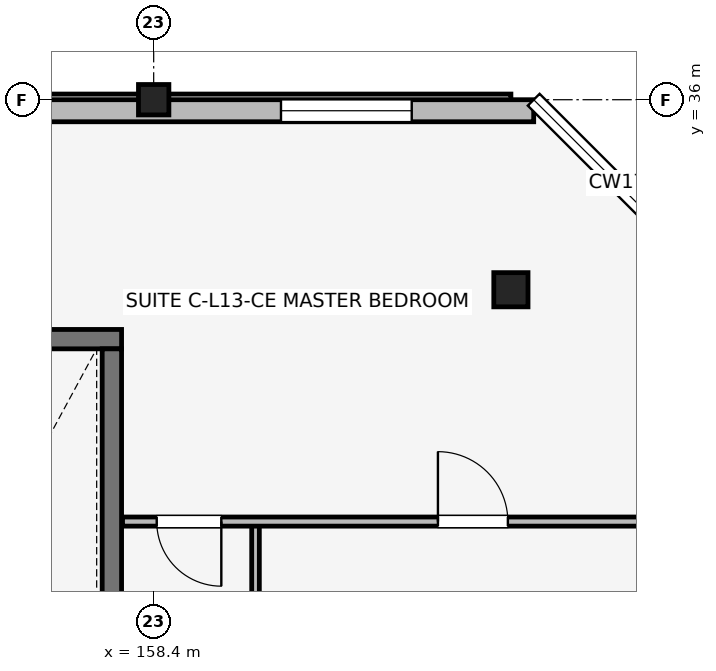
"""IFC4 building model, lengths in metres.
Left out: names, types, materials, properties, quantities, classifications, styles, units other than length and angle.
Written with IfcOpenShell. Run it as: python <this file> out.ifc"""

import sys

from ifc_helpers import new_model, si_unit, direction, frame, frame_2d, origin, origin_2d, place, context, subcontext, project, spatial, rectangle, extrude, element, fill, save


model = new_model("IFC4")
c1 = context("Model", 3, precision=1e-05, world=origin(), true_north=direction((0.0, 1.0)))
c2 = subcontext(c1, "Body", "Model", "MODEL_VIEW")
j1 = project(units=[si_unit("LENGTHUNIT", "METRE"), si_unit("PLANEANGLEUNIT", "RADIAN")], contexts=[c1])
p1 = place(None, origin())
s1 = spatial("IfcSite", under=j1, at=p1, CompositionType="ELEMENT")
p2 = place(p1, origin())
s2 = spatial("IfcBuilding", under=s1, at=p2, CompositionType="ELEMENT")
p3 = place(p2, frame((0.0, 0.0, 43.35)))
s3 = spatial("IfcBuildingStorey", under=s2, at=p3, CompositionType="ELEMENT", Elevation=43.35)
p4 = place(p3, frame((158.4, 36.0, 0.0), z_axis=(0.0, 0.0, 1.0), x_axis=(1.0, 0.0, 0.0)))
e1 = element("IfcColumn", 1, at=p4, inside=s3, PredefinedType="COLUMN", context=c2, shape_type="SweptSolid", body=[
    extrude(rectangle(XDim=0.4, YDim=0.4, at=origin_2d()), origin(), (0.0, 0.0, 1.0), 3.15),
])
p5 = place(p3, frame((163.1, 33.5, 0.0), z_axis=(0.0, 0.0, 1.0), x_axis=(1.0, 0.0, 0.0)))
e2 = element("IfcColumn", 2, at=p5, inside=s3, PredefinedType="COLUMN", context=c2, shape_type="SweptSolid", body=[
    extrude(rectangle(XDim=0.45, YDim=0.45, at=origin_2d()), origin(), (0.0, 0.0, 1.0), 3.15),
])
p6 = place(p3, frame((154.673, 32.85, 0.0), z_axis=(0.0, 0.0, 1.0), x_axis=(1.0, 0.0, 0.0)))
e3 = element("IfcWall", 3, at=p6, inside=s3, PredefinedType="SHEAR", context=c2, shape_type="SweptSolid", body=[
    extrude(rectangle(XDim=3.305, YDim=0.255, at=frame_2d((1.652, 0.0))), origin(), (0.0, 0.0, 1.0), 3.15),
])
p7 = place(p3, frame((157.85, 26.427, 0.0), z_axis=(0.0, 0.0, 1.0), x_axis=(0.0, 1.0, 0.0)))
e4 = element("IfcWall", 4, at=p7, inside=s3, PredefinedType="SHEAR", context=c2, shape_type="SweptSolid", body=[
    extrude(rectangle(XDim=6.295, YDim=0.255, at=frame_2d((3.147, 0.0))), origin(), (0.0, 0.0, 1.0), 3.15),
])
p8 = place(p3, frame((163.4, 35.855, 0.0), z_axis=(0.0, 0.0, 1.0), x_axis=(-1.0, 0.0, 0.0)))
e5 = element("IfcWall", 5, at=p8, inside=s3, PredefinedType="SOLIDWALL", context=c2, shape_type="SweptSolid", body=[
    extrude(rectangle(XDim=31.6, YDim=0.29, at=frame_2d((15.8, 0.0))), origin(), (0.0, 0.0, 1.0), 2.45),
])
p9 = place(p8, frame((15.35, 0.0, 0.5)))
e6 = element("IfcOpeningElement", 6, at=p9, cuts=e5, PredefinedType="OPENING", context=c2, shape_type="SweptSolid", body=[
    extrude(rectangle(XDim=0.9, YDim=1.8, at=frame_2d((0.45, 0.9))), frame((0.0, 0.155, 0.0), z_axis=(0.0, -1.0, 0.0), x_axis=(1.0, 0.0, 0.0)), (0.0, 0.0, 1.0), 0.31),
])
p10 = place(p8, frame((1.605, 0.0, 0.7)))
e7 = element("IfcOpeningElement", 7, at=p10, cuts=e5, PredefinedType="OPENING", context=c2, shape_type="SweptSolid", body=[
    extrude(rectangle(XDim=1.72, YDim=1.6, at=frame_2d((0.86, 0.8))), frame((0.0, 0.155, 0.0), z_axis=(0.0, -1.0, 0.0), x_axis=(1.0, 0.0, 0.0)), (0.0, 0.0, 1.0), 0.31),
])
p11 = place(p8, frame((28.205, 0.0, 0.7)))
e8 = element("IfcOpeningElement", 8, at=p11, cuts=e5, PredefinedType="OPENING", context=c2, shape_type="SweptSolid", body=[
    extrude(rectangle(XDim=1.86, YDim=1.6, at=frame_2d((0.93, 0.8))), frame((0.0, 0.155, 0.0), z_axis=(0.0, -1.0, 0.0), x_axis=(1.0, 0.0, 0.0)), (0.0, 0.0, 1.0), 0.31),
])
p12 = place(p8, frame((9.355, 0.0, 0.69)))
e9 = element("IfcOpeningElement", 9, at=p12, cuts=e5, PredefinedType="OPENING", context=c2, shape_type="SweptSolid", body=[
    extrude(rectangle(XDim=2.0, YDim=1.65, at=frame_2d((1.0, 0.825))), frame((0.0, 0.155, 0.0), z_axis=(0.0, -1.0, 0.0), x_axis=(1.0, 0.0, 0.0)), (0.0, 0.0, 1.0), 0.31),
])
p13 = place(p8, frame((20.145, 0.0, 0.69)))
e10 = element("IfcOpeningElement", 10, at=p13, cuts=e5, PredefinedType="OPENING", context=c2, shape_type="SweptSolid", body=[
    extrude(rectangle(XDim=2.15, YDim=1.65, at=frame_2d((1.075, 0.825))), frame((0.0, 0.155, 0.0), z_axis=(0.0, -1.0, 0.0), x_axis=(1.0, 0.0, 0.0)), (0.0, 0.0, 1.0), 0.31),
])
p14 = place(p3, frame((159.74, 26.1, 0.0), z_axis=(0.0, 0.0, 1.0), x_axis=(0.0, 1.0, 0.0)))
e11 = element("IfcWall", 11, at=p14, inside=s3, PredefinedType="PARTITIONING", context=c2, shape_type="SweptSolid", body=[
    extrude(rectangle(XDim=4.35, YDim=0.1, at=frame_2d((2.175, 0.0))), origin(), (0.0, 0.0, 1.0), 2.38),
])
p15 = place(p3, frame((157.99, 30.45, 0.0), z_axis=(0.0, 0.0, 1.0), x_axis=(1.0, 0.0, 0.0)))
e12 = element("IfcWall", 12, at=p15, inside=s3, PredefinedType="PARTITIONING", context=c2, shape_type="SweptSolid", body=[
    extrude(rectangle(XDim=7.47, YDim=0.12, at=frame_2d((3.735, 0.0))), origin(), (0.0, 0.0, 1.0), 2.38),
])
p16 = place(p15, frame((1.3, 0.0, 0.0), z_axis=(0.0, 0.0, 1.0), x_axis=(-1.0, 0.0, 0.0)))
e13 = element("IfcOpeningElement", 13, at=p16, cuts=e12, PredefinedType="OPENING", context=c2, shape_type="SweptSolid", body=[
    extrude(rectangle(XDim=0.85, YDim=2.08, at=frame_2d((0.425, 1.04))), frame((0.0, 0.07, 0.0), z_axis=(0.0, -1.0, 0.0), x_axis=(1.0, 0.0, 0.0)), (0.0, 0.0, 1.0), 0.14),
])
p17 = place(p15, frame((4.15, 0.0, 0.0)))
e14 = element("IfcOpeningElement", 14, at=p17, cuts=e12, PredefinedType="OPENING", context=c2, shape_type="SweptSolid", body=[
    extrude(rectangle(XDim=0.92, YDim=2.08, at=frame_2d((0.46, 1.04))), frame((0.0, 0.07, 0.0), z_axis=(0.0, -1.0, 0.0), x_axis=(1.0, 0.0, 0.0)), (0.0, 0.0, 1.0), 0.14),
])
p18 = place(p10, origin())
e15 = element("IfcWindow", 15, at=p18, inside=s3, PartitioningType="SINGLE_PANEL", PredefinedType="WINDOW", context=c2, shape_type="SweptSolid", body=[
    extrude(rectangle(XDim=1.72, YDim=1.6, at=frame_2d((0.86, 0.8))), frame((0.0, 0.03, 0.0), z_axis=(0.0, -1.0, 0.0), x_axis=(1.0, 0.0, 0.0)), (0.0, 0.0, 1.0), 0.06),
])
fill(e7, e15)
p19 = place(p16, origin())
e16 = element("IfcDoor", 16, at=p19, inside=s3, OperationType="SINGLE_SWING_RIGHT", PredefinedType="DOOR", context=c2, shape_type="SweptSolid", body=[
    extrude(rectangle(XDim=0.85, YDim=2.08, at=frame_2d((0.425, 1.04))), frame((0.0, 0.025, 0.0), z_axis=(0.0, -1.0, 0.0), x_axis=(1.0, 0.0, 0.0)), (0.0, 0.0, 1.0), 0.05),
])
fill(e13, e16)
p20 = place(p17, origin())
e17 = element("IfcDoor", 17, at=p20, inside=s3, OperationType="SINGLE_SWING_LEFT", PredefinedType="DOOR", context=c2, shape_type="SweptSolid", body=[
    extrude(rectangle(XDim=0.92, YDim=2.08, at=frame_2d((0.46, 1.04))), frame((0.0, 0.025, 0.0), z_axis=(0.0, -1.0, 0.0), x_axis=(1.0, 0.0, 0.0)), (0.0, 0.0, 1.0), 0.05),
])
fill(e14, e17)
save(model, sys.argv[1])
